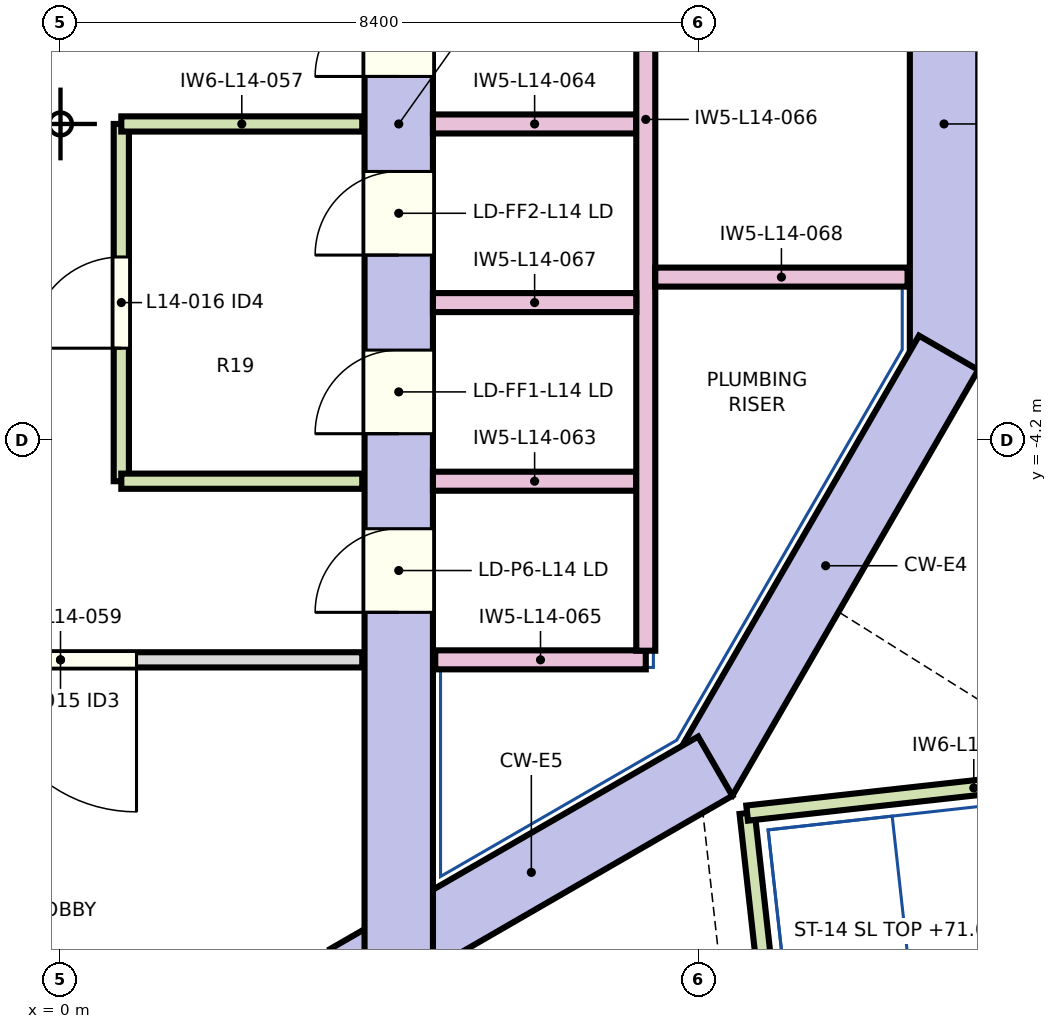
"""IFC4 building model, lengths in metres.
Left out: names, types, materials, properties, quantities, classifications, styles, units other than length and angle.
Written with IfcOpenShell. Run it as: python <this file> out.ifc"""

import sys

from ifc_helpers import new_model, si_unit, direction, frame, frame_2d, origin, place, context, subcontext, project, spatial, rectangle, extrude, element, fill, save


model = new_model("IFC4")
c1 = context("Model", 3, precision=1e-05, world=origin(), true_north=direction((0.0, 1.0)))
c2 = subcontext(c1, "Body", "Model", "MODEL_VIEW")
j1 = project(units=[si_unit("LENGTHUNIT", "METRE"), si_unit("PLANEANGLEUNIT", "RADIAN")], contexts=[c1])
p1 = place(None, origin())
s1 = spatial("IfcSite", under=j1, at=p1, CompositionType="ELEMENT")
p2 = place(p1, origin())
s2 = spatial("IfcBuilding", under=s1, at=p2, CompositionType="ELEMENT")
p3 = place(p2, frame((0.0, 0.0, 69.1)))
s3 = spatial("IfcBuildingStorey", under=s2, at=p3, CompositionType="ELEMENT", Elevation=69.1)
p4 = place(p3, frame((11.624, 3.235, 0.0), z_axis=(0.0, 0.0, 1.0), x_axis=(0.0, -1.0, 0.0)))
e1 = element("IfcWall", 1, at=p4, inside=s3, PredefinedType="SHEAR", context=c2, shape_type="SweptSolid", body=[
    extrude(rectangle(XDim=6.471, YDim=0.9, at=frame_2d((3.235, 0.0))), origin(), (0.0, 0.0, 1.0), 3.8),
])
p5 = place(p3, frame((11.684, -3.01, 0.0), z_axis=(0.0, 0.0, 1.0), x_axis=(-0.499990282633, -0.866031014036, 0.0)))
e2 = element("IfcWall", 2, at=p5, inside=s3, PredefinedType="SHEAR", context=c2, shape_type="SweptSolid", body=[
    extrude(rectangle(XDim=6.47, YDim=0.9, at=frame_2d((3.235, 0.0))), origin(), (0.0, 0.0, 1.0), 3.8),
])
p6 = place(p3, frame((8.614, -8.449, 0.0), z_axis=(0.0, 0.0, 1.0), x_axis=(-0.866026961591, -0.49999730179, 0.0)))
e3 = element("IfcWall", 3, at=p6, inside=s3, PredefinedType="SHEAR", context=c2, shape_type="SweptSolid", body=[
    extrude(rectangle(XDim=5.587, YDim=0.9, at=frame_2d((2.794, 0.0))), origin(), (0.0, 0.0, 1.0), 3.8),
])
p7 = place(p3, frame((4.45, -11.633, 0.0), z_axis=(0.0, 0.0, 1.0), x_axis=(0.0, 1.0, 0.0)))
e4 = element("IfcWall", 4, at=p7, inside=s3, PredefinedType="SHEAR", context=c2, shape_type="SweptSolid", body=[
    extrude(rectangle(XDim=23.265, YDim=0.9, at=frame_2d((11.633, 0.0))), origin(), (0.0, 0.0, 1.0), 3.8),
])
p8 = place(p7, frame((7.558, 0.0, 0.0)))
e5 = element("IfcOpeningElement", 5, at=p8, cuts=e4, PredefinedType="OPENING", context=c2, shape_type="SweptSolid", body=[
    extrude(rectangle(XDim=1.1, YDim=2.1, at=frame_2d((0.55, 1.05))), frame((0.0, 0.46, 0.0), z_axis=(0.0, -1.0, 0.0), x_axis=(1.0, 0.0, 0.0)), (0.0, 0.0, 1.0), 0.92),
])
p9 = place(p7, frame((9.907, 0.0, 0.0)))
e6 = element("IfcOpeningElement", 6, at=p9, cuts=e4, PredefinedType="OPENING", context=c2, shape_type="SweptSolid", body=[
    extrude(rectangle(XDim=1.1, YDim=2.1, at=frame_2d((0.55, 1.05))), frame((0.0, 0.46, 0.0), z_axis=(0.0, -1.0, 0.0), x_axis=(1.0, 0.0, 0.0)), (0.0, 0.0, 1.0), 0.92),
])
p10 = place(p7, frame((12.258, 0.0, 0.0)))
e7 = element("IfcOpeningElement", 7, at=p10, cuts=e4, PredefinedType="OPENING", context=c2, shape_type="SweptSolid", body=[
    extrude(rectangle(XDim=1.1, YDim=2.1, at=frame_2d((0.55, 1.05))), frame((0.0, 0.46, 0.0), z_axis=(0.0, -1.0, 0.0), x_axis=(1.0, 0.0, 0.0)), (0.0, 0.0, 1.0), 0.92),
])
p11 = place(p7, frame((14.607, 0.0, 0.0)))
e8 = element("IfcOpeningElement", 8, at=p11, cuts=e4, PredefinedType="OPENING", context=c2, shape_type="SweptSolid", body=[
    extrude(rectangle(XDim=1.1, YDim=2.1, at=frame_2d((0.55, 1.05))), frame((0.0, 0.46, 0.0), z_axis=(0.0, -1.0, 0.0), x_axis=(1.0, 0.0, 0.0)), (0.0, 0.0, 1.0), 0.92),
])
p12 = place(p7, frame((5.208, 0.0, 0.0)))
e9 = element("IfcOpeningElement", 9, at=p12, cuts=e4, PredefinedType="OPENING", context=c2, shape_type="SweptSolid", body=[
    extrude(rectangle(XDim=1.1, YDim=2.1, at=frame_2d((0.55, 1.05))), frame((0.0, 0.46, 0.0), z_axis=(0.0, -1.0, 0.0), x_axis=(1.0, 0.0, 0.0)), (0.0, 0.0, 1.0), 0.92),
])
p13 = place(p7, frame((17.008, 0.0, 0.0)))
e10 = element("IfcOpeningElement", 10, at=p13, cuts=e4, PredefinedType="OPENING", context=c2, shape_type="SweptSolid", body=[
    extrude(rectangle(XDim=1.0, YDim=2.1, at=frame_2d((0.5, 1.05))), frame((0.0, 0.46, 0.0), z_axis=(0.0, -1.0, 0.0), x_axis=(1.0, 0.0, 0.0)), (0.0, 0.0, 1.0), 0.92),
])
p14 = place(p3, frame((0.8, -4.7, 0.0), z_axis=(0.0, 0.0, 1.0), x_axis=(0.0, 1.0, 0.0)))
e11 = element("IfcWall", 11, at=p14, inside=s3, PredefinedType="SOLIDWALL", context=c2, shape_type="SweptSolid", body=[
    extrude(rectangle(XDim=4.7, YDim=0.2, at=frame_2d((2.35, 0.0))), origin(), (0.0, 0.0, 1.0), 3.55),
])
p15 = place(p14, frame((1.75, 0.0, 0.0)))
e12 = element("IfcOpeningElement", 12, at=p15, cuts=e11, PredefinedType="OPENING", context=c2, shape_type="SweptSolid", body=[
    extrude(rectangle(XDim=1.2, YDim=2.1, at=frame_2d((0.6, 1.05))), frame((0.0, 0.11, 0.0), z_axis=(0.0, -1.0, 0.0), x_axis=(1.0, 0.0, 0.0)), (0.0, 0.0, 1.0), 0.22),
])
p16 = place(p3, frame((0.8, 0.0, 0.0), z_axis=(0.0, 0.0, 1.0), x_axis=(1.0, 0.0, 0.0)))
e13 = element("IfcWall", 13, at=p16, inside=s3, PredefinedType="SOLIDWALL", context=c2, shape_type="SweptSolid", body=[
    extrude(rectangle(XDim=3.17, YDim=0.2, at=frame_2d((1.585, 0.0))), origin(), (0.0, 0.0, 1.0), 3.55),
])
p17 = place(p3, frame((3.97, -7.05, 0.0), z_axis=(0.0, 0.0, 1.0), x_axis=(-1.0, 0.0, 0.0)))
e14 = element("IfcWall", 14, at=p17, inside=s3, PredefinedType="PARTITIONING", context=c2, shape_type="SweptSolid", body=[
    extrude(rectangle(XDim=7.94, YDim=0.2, at=frame_2d((3.97, 0.0))), origin(), (0.0, 0.0, 1.0), 3.55),
])
p18 = place(p17, frame((2.97, 0.0, 0.0)))
e15 = element("IfcOpeningElement", 15, at=p18, cuts=e14, PredefinedType="OPENING", context=c2, shape_type="SweptSolid", body=[
    extrude(rectangle(XDim=2.0, YDim=2.1, at=frame_2d((1.0, 1.05))), frame((0.0, 0.11, 0.0), z_axis=(0.0, -1.0, 0.0), x_axis=(1.0, 0.0, 0.0)), (0.0, 0.0, 1.0), 0.22),
])
p19 = place(p3, frame((3.97, -4.7, 0.0), z_axis=(0.0, 0.0, 1.0), x_axis=(-1.0, 0.0, 0.0)))
e16 = element("IfcWall", 16, at=p19, inside=s3, PredefinedType="SOLIDWALL", context=c2, shape_type="SweptSolid", body=[
    extrude(rectangle(XDim=3.17, YDim=0.2, at=frame_2d((1.585, 0.0))), origin(), (0.0, 0.0, 1.0), 3.55),
])
for number, where, z_axis, x_axis in (
    (17, (4.9, -4.7, 0.0), (0.0, 0.0, 1.0), (1.0, 0.0, 0.0)),
    (18, (4.9, 0.0, 0.0), (0.0, 0.0, 1.0), (1.0, 0.0, 0.0)),
):
    element("IfcWall", number, at=place(p3, frame(where, z_axis=z_axis, x_axis=x_axis)), inside=s3, PredefinedType="SOLIDWALL", context=c2, shape_type="SweptSolid", body=[
        extrude(rectangle(XDim=2.675, YDim=0.25, at=frame_2d((1.337, 0.0))), origin(), (0.0, 0.0, 1.0), 3.55),
    ])
p20 = place(p3, frame((4.93, -7.05, 0.0), z_axis=(0.0, 0.0, 1.0), x_axis=(1.0, 0.0, 0.0)))
e19 = element("IfcWall", 19, at=p20, inside=s3, PredefinedType="SOLIDWALL", context=c2, shape_type="SweptSolid", body=[
    extrude(rectangle(XDim=2.77, YDim=0.25, at=frame_2d((1.385, 0.0))), origin(), (0.0, 0.0, 1.0), 3.55),
])
p21 = place(p3, frame((7.7, -6.93, 0.0), z_axis=(0.0, 0.0, 1.0), x_axis=(0.0, 1.0, 0.0)))
e20 = element("IfcWall", 20, at=p21, inside=s3, PredefinedType="SOLIDWALL", context=c2, shape_type="SweptSolid", body=[
    extrude(rectangle(XDim=13.98, YDim=0.25, at=frame_2d((6.99, 0.0))), origin(), (0.0, 0.0, 1.0), 3.55),
])
p22 = place(p3, frame((7.575, -2.35, 0.0), z_axis=(0.0, 0.0, 1.0), x_axis=(-1.0, 0.0, 0.0)))
e21 = element("IfcWall", 21, at=p22, inside=s3, PredefinedType="SOLIDWALL", context=c2, shape_type="SweptSolid", body=[
    extrude(rectangle(XDim=2.675, YDim=0.25, at=frame_2d((1.337, 0.0))), origin(), (0.0, 0.0, 1.0), 3.55),
])
p23 = place(p3, frame((7.825, -2.015, 0.0), z_axis=(0.0, 0.0, 1.0), x_axis=(1.0, 0.0, 0.0)))
e22 = element("IfcWall", 22, at=p23, inside=s3, PredefinedType="SOLIDWALL", context=c2, shape_type="SweptSolid", body=[
    extrude(rectangle(XDim=3.319, YDim=0.25, at=frame_2d((1.66, 0.0))), origin(), (0.0, 0.0, 1.0), 3.55),
])
p24 = place(p3, frame((9.033, -9.066, 0.0), z_axis=(0.0, 0.0, 1.0), x_axis=(0.11030110325, -0.993898217436, 0.0)))
e23 = element("IfcWall", 23, at=p24, inside=s3, PredefinedType="SOLIDWALL", context=c2, shape_type="SweptSolid", body=[
    extrude(rectangle(XDim=3.493, YDim=0.2, at=frame_2d((1.746, 0.0))), origin(), (0.0, 0.0, 1.0), 3.55),
])
p25 = place(p3, frame((14.997, -8.404, 0.0), z_axis=(0.0, 0.0, 1.0), x_axis=(-0.993897125329, -0.110310943534, 0.0)))
e24 = element("IfcWall", 24, at=p25, inside=s3, PredefinedType="SOLIDWALL", context=c2, shape_type="SweptSolid", body=[
    extrude(rectangle(XDim=6.0, YDim=0.2, at=frame_2d((3.0, 0.0))), origin(), (0.0, 0.0, 1.0), 3.55),
])
p26 = place(p18, origin())
e25 = element("IfcDoor", 25, at=p26, inside=s3, OperationType="NOTDEFINED", PredefinedType="DOOR", context=c2, shape_type="SweptSolid", body=[
    extrude(rectangle(XDim=2.0, YDim=2.1, at=frame_2d((1.0, 1.05))), frame((0.0, 0.025, 0.0), z_axis=(0.0, -1.0, 0.0), x_axis=(1.0, 0.0, 0.0)), (0.0, 0.0, 1.0), 0.05),
])
fill(e15, e25)
p27 = place(p15, origin())
e26 = element("IfcDoor", 26, at=p27, inside=s3, OperationType="NOTDEFINED", PredefinedType="DOOR", context=c2, shape_type="SweptSolid", body=[
    extrude(rectangle(XDim=1.2, YDim=2.1, at=frame_2d((0.6, 1.05))), frame((0.0, 0.025, 0.0), z_axis=(0.0, -1.0, 0.0), x_axis=(1.0, 0.0, 0.0)), (0.0, 0.0, 1.0), 0.05),
])
fill(e12, e26)
p28 = place(p8, origin())
e27 = element("IfcDoor", 27, at=p28, inside=s3, OperationType="SLIDING_TO_LEFT", PredefinedType="DOOR", context=c2, shape_type="SweptSolid", body=[
    extrude(rectangle(XDim=1.1, YDim=2.1, at=frame_2d((0.55, 1.05))), frame((0.0, 0.025, 0.0), z_axis=(0.0, -1.0, 0.0), x_axis=(1.0, 0.0, 0.0)), (0.0, 0.0, 1.0), 0.05),
])
fill(e5, e27)
p29 = place(p9, origin())
e28 = element("IfcDoor", 28, at=p29, inside=s3, OperationType="SLIDING_TO_LEFT", PredefinedType="DOOR", context=c2, shape_type="SweptSolid", body=[
    extrude(rectangle(XDim=1.1, YDim=2.1, at=frame_2d((0.55, 1.05))), frame((0.0, 0.025, 0.0), z_axis=(0.0, -1.0, 0.0), x_axis=(1.0, 0.0, 0.0)), (0.0, 0.0, 1.0), 0.05),
])
fill(e6, e28)
p30 = place(p10, origin())
e29 = element("IfcDoor", 29, at=p30, inside=s3, OperationType="SLIDING_TO_LEFT", PredefinedType="DOOR", context=c2, shape_type="SweptSolid", body=[
    extrude(rectangle(XDim=1.1, YDim=2.1, at=frame_2d((0.55, 1.05))), frame((0.0, 0.025, 0.0), z_axis=(0.0, -1.0, 0.0), x_axis=(1.0, 0.0, 0.0)), (0.0, 0.0, 1.0), 0.05),
])
fill(e7, e29)
p31 = place(p12, origin())
e30 = element("IfcDoor", 30, at=p31, inside=s3, OperationType="SLIDING_TO_LEFT", PredefinedType="DOOR", context=c2, shape_type="SweptSolid", body=[
    extrude(rectangle(XDim=1.1, YDim=2.1, at=frame_2d((0.55, 1.05))), frame((0.0, 0.025, 0.0), z_axis=(0.0, -1.0, 0.0), x_axis=(1.0, 0.0, 0.0)), (0.0, 0.0, 1.0), 0.05),
])
fill(e9, e30)
save(model, sys.argv[1])
